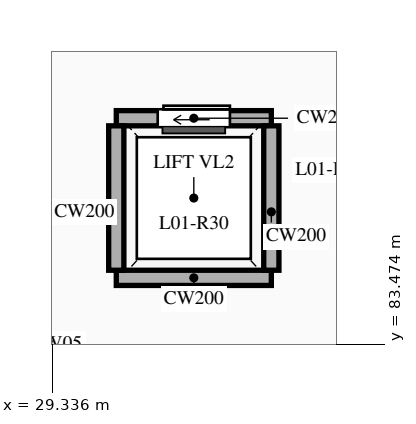
"""IFC4 building model, lengths in metres.
Left out: names, types, materials, properties, quantities, classifications, styles, units other than length and angle.
Written with IfcOpenShell. Run it as: python <this file> out.ifc"""

import sys

from ifc_helpers import new_model, si_unit, direction, frame, frame_2d, origin, place, context, subcontext, project, spatial, rectangle, extrude, element, fill, save


model = new_model("IFC4")
c1 = context("Model", 3, precision=1e-05, world=origin(), true_north=direction((0.0, 1.0)))
c2 = subcontext(c1, "Body", "Model", "MODEL_VIEW")
j1 = project(units=[si_unit("LENGTHUNIT", "METRE"), si_unit("PLANEANGLEUNIT", "RADIAN")], contexts=[c1])
p1 = place(None, origin())
s1 = spatial("IfcSite", under=j1, at=p1, CompositionType="ELEMENT")
p2 = place(p1, origin())
s2 = spatial("IfcBuilding", under=s1, at=p2, CompositionType="ELEMENT")
p3 = place(p2, frame((0.0, 0.0, 5.4)))
s3 = spatial("IfcBuildingStorey", under=s2, at=p3, CompositionType="ELEMENT", Elevation=5.4)
p4 = place(p3, frame((30.18, 86.45, 0.0), z_axis=(0.0, 0.0, 1.0), x_axis=(1.0, 0.0, 0.0)))
e1 = element("IfcWall", 1, at=p4, inside=s3, PredefinedType="SOLIDWALL", context=c2, shape_type="SweptSolid", body=[
    extrude(rectangle(XDim=2.04, YDim=0.2, at=frame_2d((1.02, 0.0))), origin(), (0.0, 0.0, 1.0), 4.58),
])
p5 = place(p4, frame((0.545, 0.0, 0.0)))
e2 = element("IfcOpeningElement", 2, at=p5, cuts=e1, PredefinedType="OPENING", context=c2, shape_type="SweptSolid", body=[
    extrude(rectangle(XDim=0.95, YDim=2.15, at=frame_2d((0.475, 1.075))), frame((0.0, 0.11, 0.0), z_axis=(0.0, -1.0, 0.0), x_axis=(1.0, 0.0, 0.0)), (0.0, 0.0, 1.0), 0.22),
])
p6 = place(p3, frame((30.18, 84.35, 0.0), z_axis=(0.0, 0.0, 1.0), x_axis=(1.0, 0.0, 0.0)))
e3 = element("IfcWall", 3, at=p6, inside=s3, PredefinedType="SOLIDWALL", context=c2, shape_type="SweptSolid", body=[
    extrude(rectangle(XDim=2.04, YDim=0.2, at=frame_2d((1.02, 0.0))), origin(), (0.0, 0.0, 1.0), 4.58),
])
for number, where, z_axis, x_axis in (
    (4, (30.18, 84.45, 0.0), (0.0, 0.0, 1.0), (0.0, 1.0, 0.0)),
    (5, (32.22, 84.45, 0.0), (0.0, 0.0, 1.0), (0.0, 1.0, 0.0)),
):
    element("IfcWall", number, at=place(p3, frame(where, z_axis=z_axis, x_axis=x_axis)), inside=s3, PredefinedType="SOLIDWALL", context=c2, shape_type="SweptSolid", body=[
        extrude(rectangle(XDim=1.9, YDim=0.2, at=frame_2d((0.95, 0.0))), origin(), (0.0, 0.0, 1.0), 4.58),
    ])
p7 = place(p5, origin())
e6 = element("IfcDoor", 6, at=p7, inside=s3, OperationType="SLIDING_TO_LEFT", PredefinedType="DOOR", context=c2, shape_type="SweptSolid", body=[
    extrude(rectangle(XDim=0.95, YDim=2.15, at=frame_2d((0.475, 1.075))), frame((0.0, 0.025, 0.0), z_axis=(0.0, -1.0, 0.0), x_axis=(1.0, 0.0, 0.0)), (0.0, 0.0, 1.0), 0.05),
])
fill(e2, e6)
save(model, sys.argv[1])
